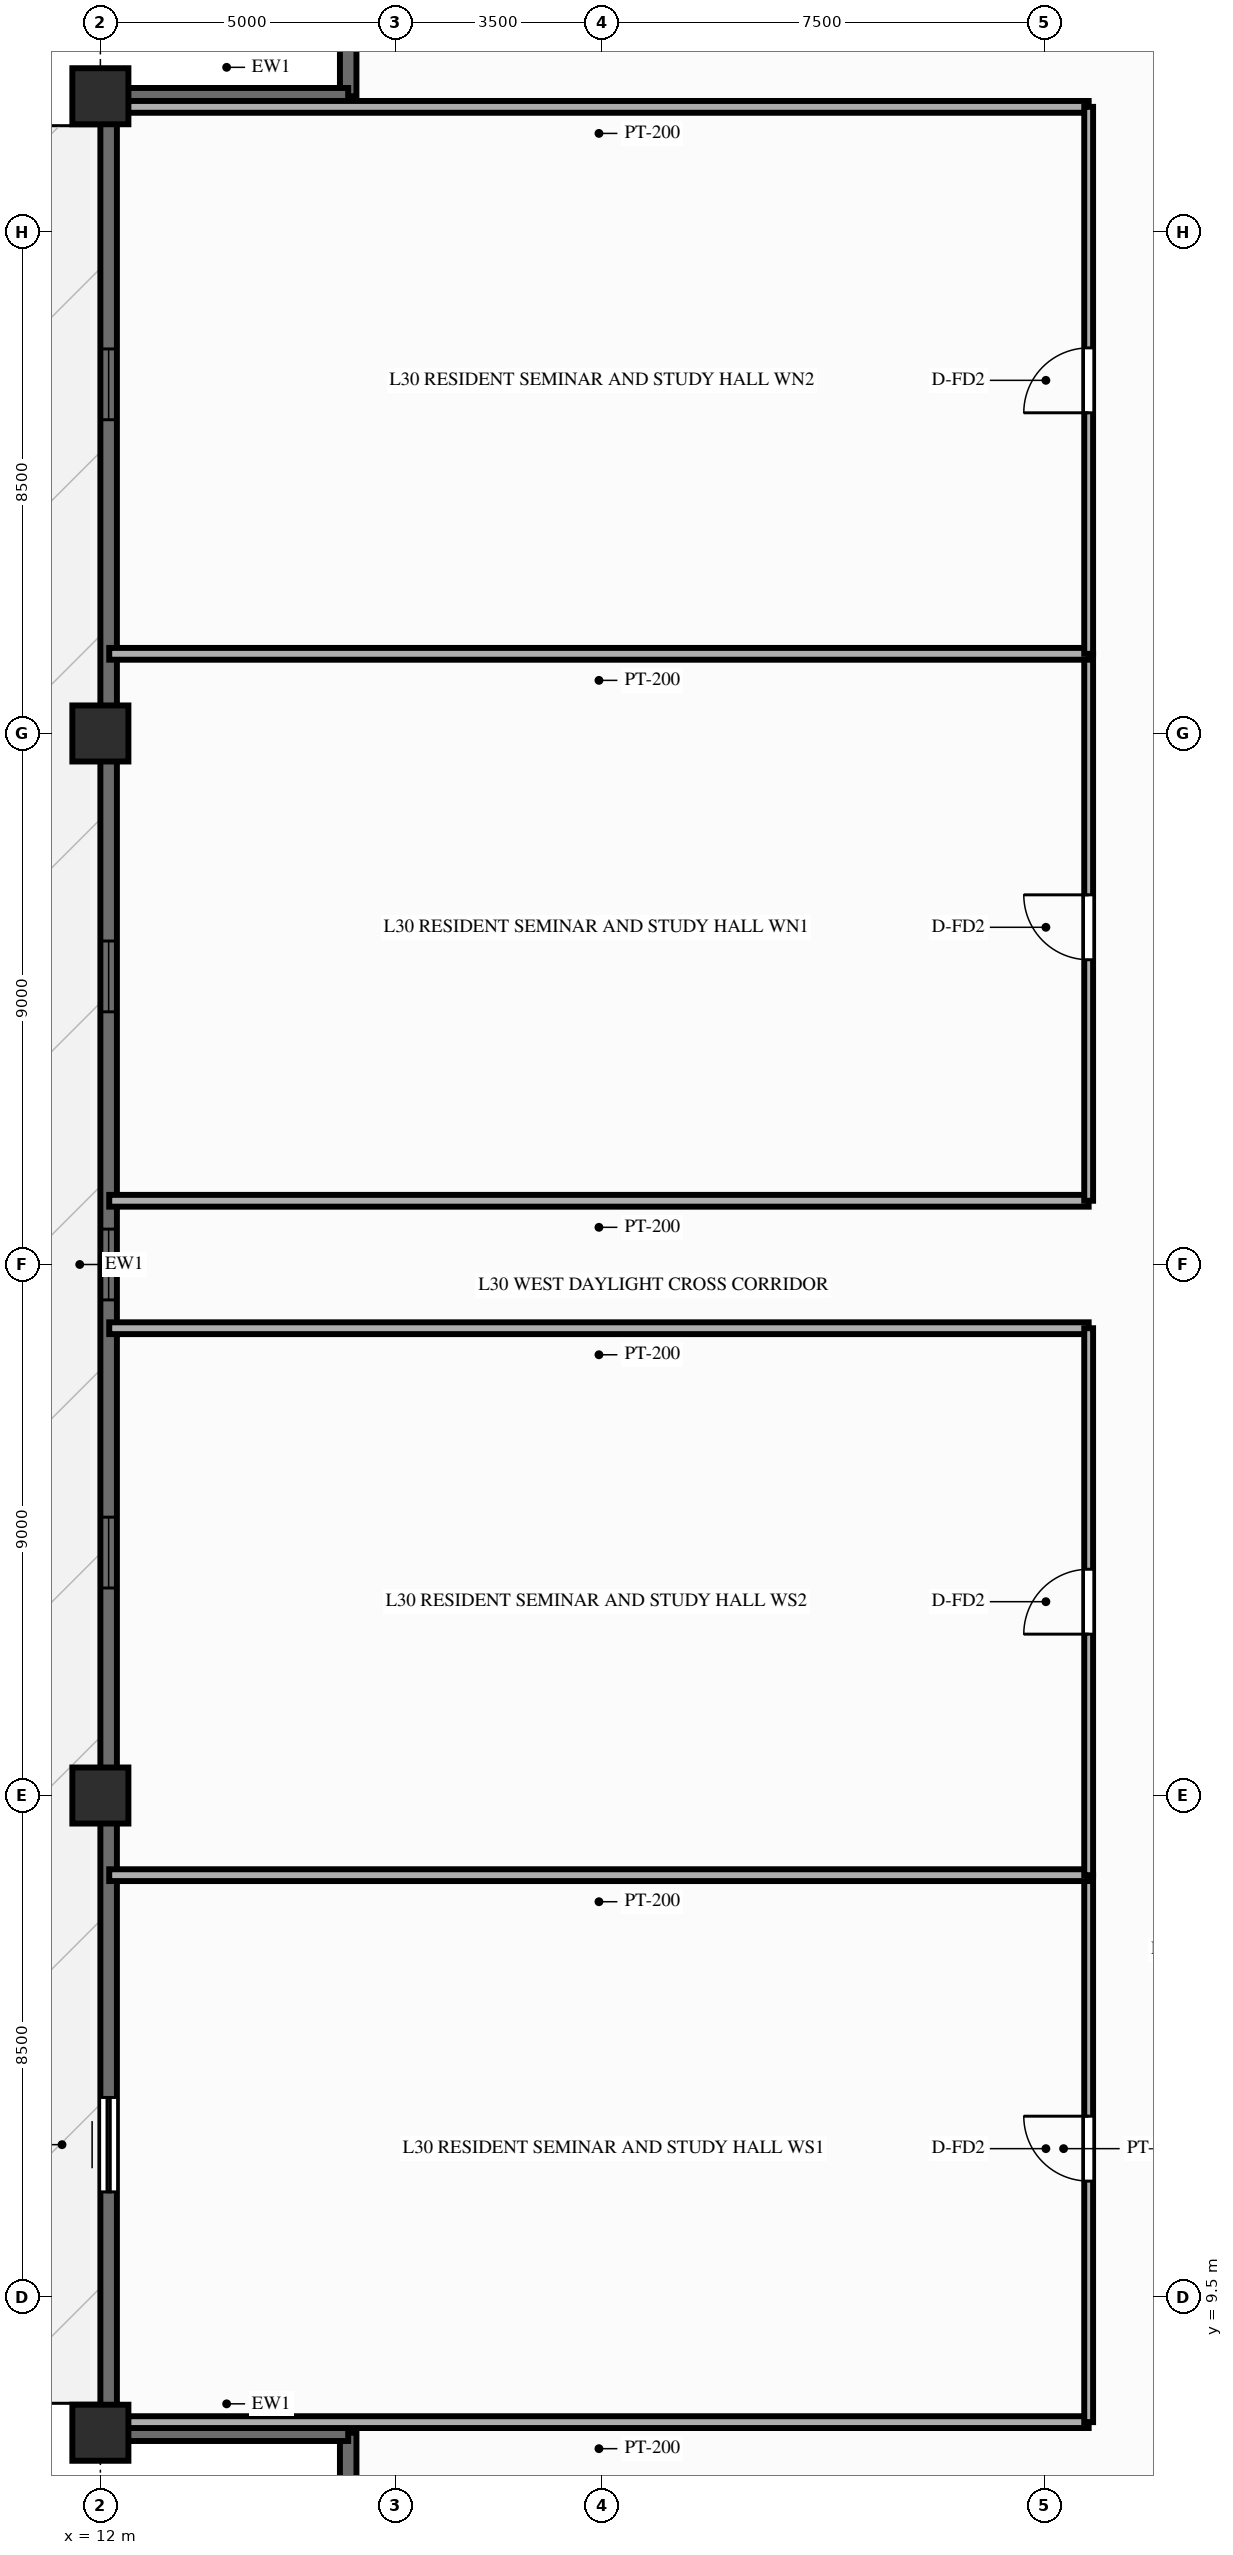
"""IFC4 building model, lengths in metres.
Left out: names, types, materials, properties, quantities, classifications, styles, units other than length and angle.
Written with IfcOpenShell. Run it as: python <this file> out.ifc"""

import sys

from ifc_helpers import new_model, si_unit, direction, frame, frame_2d, origin, origin_2d, place, context, subcontext, project, spatial, rectangle, extrude, source, transform, mapped, element, fill, save


model = new_model("IFC4")
c1 = context("Model", 3, precision=1e-05, world=origin(), true_north=direction((0.0, 1.0)))
c2 = subcontext(c1, "Body", "Model", "MODEL_VIEW")
j1 = project(units=[si_unit("LENGTHUNIT", "METRE"), si_unit("PLANEANGLEUNIT", "RADIAN")], contexts=[c1])
p1 = place(None, origin())
s1 = spatial("IfcSite", under=j1, at=p1, CompositionType="ELEMENT")
p2 = place(p1, origin())
s2 = spatial("IfcBuilding", under=s1, at=p2, CompositionType="ELEMENT")
p3 = place(p2, frame((0.0, 0.0, 95.85)))
s3 = spatial("IfcBuildingStorey", under=s2, at=p3, CompositionType="ELEMENT", Elevation=95.85)
m1 = source(origin(), c2, "Body", "SweptSolid", [
    extrude(rectangle(XDim=0.95, YDim=0.95, at=origin_2d()), origin(), (0.0, 0.0, 1.0), 3.0),
])
for number, where, z_axis, x_axis in (
    (1, (12.0, 46.8, 0.0), (0.0, 0.0, 1.0), (1.0, 0.0, 0.0)),
    (2, (12.0, 36.0, 0.0), (0.0, 0.0, 1.0), (1.0, 0.0, 0.0)),
    (3, (12.0, 18.0, 0.0), (0.0, 0.0, 1.0), (1.0, 0.0, 0.0)),
    (4, (12.0, 7.2, 0.0), (0.0, 0.0, 1.0), (1.0, 0.0, 0.0)),
):
    element("IfcColumn", number, at=place(p3, frame(where, z_axis=z_axis, x_axis=x_axis)), inside=s3, PredefinedType="COLUMN", context=c2, shape_type="MappedRepresentation", body=[
        mapped(m1, transform((0.0, 0.0, 0.0), scale=1.0)),
    ])
p4 = place(p3, frame((12.14, 7.2, 0.0), z_axis=(0.0, 0.0, 1.0), x_axis=(0.0, 1.0, 0.0)))
e5 = element("IfcWall", 5, at=p4, inside=s3, PredefinedType="SOLIDWALL", context=c2, shape_type="SweptSolid", body=[
    extrude(rectangle(XDim=39.6, YDim=0.28, at=frame_2d((19.8, 0.0))), origin(), (0.0, 0.0, 1.0), 2.28),
])
p5 = place(p4, frame((4.083, 0.0, 0.0)))
e6 = element("IfcOpeningElement", 6, at=p5, cuts=e5, PredefinedType="OPENING", context=c2, shape_type="SweptSolid", body=[
    extrude(rectangle(XDim=1.6, YDim=2.15, at=frame_2d((0.8, 1.075))), frame((0.0, 0.152, 0.0), z_axis=(0.0, -1.0, 0.0), x_axis=(1.0, 0.0, 0.0)), (0.0, 0.0, 1.0), 0.304),
])
p6 = place(p4, frame((14.317, 0.0, 0.25)))
e7 = element("IfcOpeningElement", 7, at=p6, cuts=e5, PredefinedType="OPENING", context=c2, shape_type="SweptSolid", body=[
    extrude(rectangle(XDim=1.2, YDim=1.5, at=frame_2d((0.6, 0.75))), frame((0.0, 0.152, 0.0), z_axis=(0.0, -1.0, 0.0), x_axis=(1.0, 0.0, 0.0)), (0.0, 0.0, 1.0), 0.304),
])
p7 = place(p4, frame((19.2, 0.0, 0.25)))
e8 = element("IfcOpeningElement", 8, at=p7, cuts=e5, PredefinedType="OPENING", context=c2, shape_type="SweptSolid", body=[
    extrude(rectangle(XDim=1.2, YDim=1.5, at=frame_2d((0.6, 0.75))), frame((0.0, 0.152, 0.0), z_axis=(0.0, -1.0, 0.0), x_axis=(1.0, 0.0, 0.0)), (0.0, 0.0, 1.0), 0.304),
])
p8 = place(p4, frame((24.083, 0.0, 0.25)))
e9 = element("IfcOpeningElement", 9, at=p8, cuts=e5, PredefinedType="OPENING", context=c2, shape_type="SweptSolid", body=[
    extrude(rectangle(XDim=1.2, YDim=1.5, at=frame_2d((0.6, 0.75))), frame((0.0, 0.152, 0.0), z_axis=(0.0, -1.0, 0.0), x_axis=(1.0, 0.0, 0.0)), (0.0, 0.0, 1.0), 0.304),
])
p9 = place(p4, frame((34.117, 0.0, 0.25)))
e10 = element("IfcOpeningElement", 10, at=p9, cuts=e5, PredefinedType="OPENING", context=c2, shape_type="SweptSolid", body=[
    extrude(rectangle(XDim=1.2, YDim=1.5, at=frame_2d((0.6, 0.75))), frame((0.0, 0.152, 0.0), z_axis=(0.0, -1.0, 0.0), x_axis=(1.0, 0.0, 0.0)), (0.0, 0.0, 1.0), 0.304),
])
for number, where, z_axis, x_axis in (
    (11, (16.2, 3.08, 0.0), (0.0, 0.0, 1.0), (0.0, 1.0, 0.0)),
    (12, (12.08, 7.2, 0.0), (0.0, 0.0, 1.0), (1.0, 0.0, 0.0)),
    (13, (16.2, 46.8, 0.0), (0.0, 0.0, 1.0), (0.0, 1.0, 0.0)),
    (14, (12.08, 46.8, 0.0), (0.0, 0.0, 1.0), (1.0, 0.0, 0.0)),
):
    element("IfcWall", number, at=place(p3, frame(where, z_axis=z_axis, x_axis=x_axis)), inside=s3, PredefinedType="SOLIDWALL", context=c2, shape_type="SweptSolid", body=[
        extrude(rectangle(XDim=4.12, YDim=0.28, at=frame_2d((2.06, 0.0))), origin(), (0.0, 0.0, 1.0), 2.28),
    ])
for number, where, z_axis, x_axis in (
    (15, (28.75, 7.38, 0.0), (0.0, 0.0, 1.0), (-1.0, 0.0, 0.0)),
    (16, (28.75, 25.92, 0.0), (0.0, 0.0, 1.0), (-1.0, 0.0, 0.0)),
):
    element("IfcWall", number, at=place(p3, frame(where, z_axis=z_axis, x_axis=x_axis)), inside=s3, PredefinedType="PARTITIONING", context=c2, shape_type="SweptSolid", body=[
        extrude(rectangle(XDim=16.6, YDim=0.2, at=frame_2d((8.3, 0.0))), origin(), (0.0, 0.0, 1.0), 2.79),
    ])
p10 = place(p3, frame((28.75, 7.38, 0.0), z_axis=(0.0, 0.0, 1.0), x_axis=(0.0, 1.0, 0.0)))
e17 = element("IfcWall", 17, at=p10, inside=s3, PredefinedType="PARTITIONING", context=c2, shape_type="SweptSolid", body=[
    extrude(rectangle(XDim=9.27, YDim=0.15, at=frame_2d((4.635, 0.0))), origin(), (0.0, 0.0, 1.0), 2.79),
])
p11 = place(p10, frame((4.085, 0.0, 0.0)))
e18 = element("IfcOpeningElement", 18, at=p11, cuts=e17, PredefinedType="OPENING", context=c2, shape_type="SweptSolid", body=[
    extrude(rectangle(XDim=1.1, YDim=2.15, at=frame_2d((0.55, 1.075))), frame((0.0, 0.087, 0.0), z_axis=(0.0, -1.0, 0.0), x_axis=(1.0, 0.0, 0.0)), (0.0, 0.0, 1.0), 0.174),
])
p12 = place(p3, frame((28.75, 16.65, 0.0), z_axis=(0.0, 0.0, 1.0), x_axis=(-1.0, 0.0, 0.0)))
e19 = element("IfcWall", 19, at=p12, inside=s3, PredefinedType="PARTITIONING", context=c2, shape_type="SweptSolid", body=[
    extrude(rectangle(XDim=16.6, YDim=0.2, at=frame_2d((8.3, 0.0))), origin(), (0.0, 0.0, 1.0), 2.79),
])
p13 = place(p3, frame((28.75, 16.65, 0.0), z_axis=(0.0, 0.0, 1.0), x_axis=(0.0, 1.0, 0.0)))
e20 = element("IfcWall", 20, at=p13, inside=s3, PredefinedType="PARTITIONING", context=c2, shape_type="SweptSolid", body=[
    extrude(rectangle(XDim=9.27, YDim=0.15, at=frame_2d((4.635, 0.0))), origin(), (0.0, 0.0, 1.0), 2.79),
])
p14 = place(p13, frame((4.085, 0.0, 0.0)))
e21 = element("IfcOpeningElement", 21, at=p14, cuts=e20, PredefinedType="OPENING", context=c2, shape_type="SweptSolid", body=[
    extrude(rectangle(XDim=1.1, YDim=2.15, at=frame_2d((0.55, 1.075))), frame((0.0, 0.087, 0.0), z_axis=(0.0, -1.0, 0.0), x_axis=(1.0, 0.0, 0.0)), (0.0, 0.0, 1.0), 0.174),
])
for number, where, z_axis, x_axis in (
    (22, (28.75, 28.08, 0.0), (0.0, 0.0, 1.0), (-1.0, 0.0, 0.0)),
    (23, (28.75, 46.62, 0.0), (0.0, 0.0, 1.0), (-1.0, 0.0, 0.0)),
):
    element("IfcWall", number, at=place(p3, frame(where, z_axis=z_axis, x_axis=x_axis)), inside=s3, PredefinedType="PARTITIONING", context=c2, shape_type="SweptSolid", body=[
        extrude(rectangle(XDim=16.6, YDim=0.2, at=frame_2d((8.3, 0.0))), origin(), (0.0, 0.0, 1.0), 2.79),
    ])
p15 = place(p3, frame((28.75, 28.08, 0.0), z_axis=(0.0, 0.0, 1.0), x_axis=(0.0, 1.0, 0.0)))
e24 = element("IfcWall", 24, at=p15, inside=s3, PredefinedType="PARTITIONING", context=c2, shape_type="SweptSolid", body=[
    extrude(rectangle(XDim=9.27, YDim=0.15, at=frame_2d((4.635, 0.0))), origin(), (0.0, 0.0, 1.0), 2.79),
])
p16 = place(p15, frame((4.085, 0.0, 0.0)))
e25 = element("IfcOpeningElement", 25, at=p16, cuts=e24, PredefinedType="OPENING", context=c2, shape_type="SweptSolid", body=[
    extrude(rectangle(XDim=1.1, YDim=2.15, at=frame_2d((0.55, 1.075))), frame((0.0, 0.087, 0.0), z_axis=(0.0, -1.0, 0.0), x_axis=(1.0, 0.0, 0.0)), (0.0, 0.0, 1.0), 0.174),
])
p17 = place(p3, frame((28.75, 37.35, 0.0), z_axis=(0.0, 0.0, 1.0), x_axis=(-1.0, 0.0, 0.0)))
e26 = element("IfcWall", 26, at=p17, inside=s3, PredefinedType="PARTITIONING", context=c2, shape_type="SweptSolid", body=[
    extrude(rectangle(XDim=16.6, YDim=0.2, at=frame_2d((8.3, 0.0))), origin(), (0.0, 0.0, 1.0), 2.79),
])
p18 = place(p3, frame((28.75, 37.35, 0.0), z_axis=(0.0, 0.0, 1.0), x_axis=(0.0, 1.0, 0.0)))
e27 = element("IfcWall", 27, at=p18, inside=s3, PredefinedType="PARTITIONING", context=c2, shape_type="SweptSolid", body=[
    extrude(rectangle(XDim=9.27, YDim=0.15, at=frame_2d((4.635, 0.0))), origin(), (0.0, 0.0, 1.0), 2.79),
])
p19 = place(p18, frame((4.085, 0.0, 0.0)))
e28 = element("IfcOpeningElement", 28, at=p19, cuts=e27, PredefinedType="OPENING", context=c2, shape_type="SweptSolid", body=[
    extrude(rectangle(XDim=1.1, YDim=2.15, at=frame_2d((0.55, 1.075))), frame((0.0, 0.087, 0.0), z_axis=(0.0, -1.0, 0.0), x_axis=(1.0, 0.0, 0.0)), (0.0, 0.0, 1.0), 0.174),
])
m2 = source(origin(), c2, "Body", "SweptSolid", [
    extrude(rectangle(XDim=1.6, YDim=2.15, at=frame_2d((0.8, 1.075))), frame((0.0, 0.025, 0.0), z_axis=(0.0, -1.0, 0.0), x_axis=(1.0, 0.0, 0.0)), (0.0, 0.0, 1.0), 0.05),
])
p20 = place(p5, origin())
e29 = element("IfcDoor", 29, at=p20, inside=s3, OperationType="SLIDING_TO_LEFT", PredefinedType="DOOR", context=c2, shape_type="MappedRepresentation", body=[
    mapped(m2, transform((0.0, 0.0, 0.0), scale=1.0)),
])
fill(e6, e29)
m3 = source(origin(), c2, "Body", "SweptSolid", [
    extrude(rectangle(XDim=1.2, YDim=1.5, at=frame_2d((0.6, 0.75))), frame((0.0, 0.03, 0.0), z_axis=(0.0, -1.0, 0.0), x_axis=(1.0, 0.0, 0.0)), (0.0, 0.0, 1.0), 0.06),
])
p21 = place(p6, origin())
e30 = element("IfcWindow", 30, at=p21, inside=s3, PartitioningType="SINGLE_PANEL", PredefinedType="WINDOW", context=c2, shape_type="MappedRepresentation", body=[
    mapped(m3, transform((0.0, 0.0, 0.0), scale=1.0)),
])
fill(e7, e30)
p22 = place(p7, origin())
e31 = element("IfcWindow", 31, at=p22, inside=s3, PartitioningType="SINGLE_PANEL", PredefinedType="WINDOW", context=c2, shape_type="MappedRepresentation", body=[
    mapped(m3, transform((0.0, 0.0, 0.0), scale=1.0)),
])
fill(e8, e31)
p23 = place(p8, origin())
e32 = element("IfcWindow", 32, at=p23, inside=s3, PartitioningType="SINGLE_PANEL", PredefinedType="WINDOW", context=c2, shape_type="MappedRepresentation", body=[
    mapped(m3, transform((0.0, 0.0, 0.0), scale=1.0)),
])
fill(e9, e32)
p24 = place(p9, origin())
e33 = element("IfcWindow", 33, at=p24, inside=s3, PartitioningType="SINGLE_PANEL", PredefinedType="WINDOW", context=c2, shape_type="MappedRepresentation", body=[
    mapped(m3, transform((0.0, 0.0, 0.0), scale=1.0)),
])
fill(e10, e33)
m4 = source(origin(), c2, "Body", "SweptSolid", [
    extrude(rectangle(XDim=1.1, YDim=2.15, at=frame_2d((0.55, 1.075))), frame((0.0, 0.025, 0.0), z_axis=(0.0, -1.0, 0.0), x_axis=(1.0, 0.0, 0.0)), (0.0, 0.0, 1.0), 0.05),
])
p25 = place(p11, origin())
e34 = element("IfcDoor", 34, at=p25, inside=s3, OperationType="SINGLE_SWING_RIGHT", PredefinedType="DOOR", context=c2, shape_type="MappedRepresentation", body=[
    mapped(m4, transform((0.0, 0.0, 0.0), scale=1.0)),
])
fill(e18, e34)
p26 = place(p14, origin())
e35 = element("IfcDoor", 35, at=p26, inside=s3, OperationType="SINGLE_SWING_LEFT", PredefinedType="DOOR", context=c2, shape_type="MappedRepresentation", body=[
    mapped(m4, transform((0.0, 0.0, 0.0), scale=1.0)),
])
fill(e21, e35)
p27 = place(p16, origin())
e36 = element("IfcDoor", 36, at=p27, inside=s3, OperationType="SINGLE_SWING_RIGHT", PredefinedType="DOOR", context=c2, shape_type="MappedRepresentation", body=[
    mapped(m4, transform((0.0, 0.0, 0.0), scale=1.0)),
])
fill(e25, e36)
p28 = place(p19, origin())
e37 = element("IfcDoor", 37, at=p28, inside=s3, OperationType="SINGLE_SWING_LEFT", PredefinedType="DOOR", context=c2, shape_type="MappedRepresentation", body=[
    mapped(m4, transform((0.0, 0.0, 0.0), scale=1.0)),
])
fill(e28, e37)
save(model, sys.argv[1])
